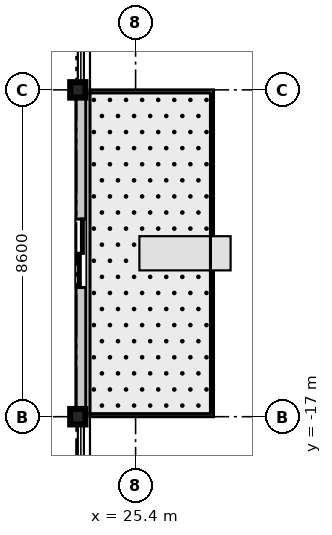
"""IFC4 building model, lengths in metres.
Left out: names, types, materials, properties, quantities, classifications, styles, units other than length and angle.
Written with IfcOpenShell. Run it as: python <this file> out.ifc"""

import sys

from ifc_helpers import new_model, si_unit, direction, frame, frame_2d, origin, origin_2d, place, context, subcontext, project, spatial, rectangle, i_section, extrude, source, transform, mapped, element, fill, save


model = new_model("IFC4")
c1 = context("Model", 3, precision=1e-05, world=origin(), true_north=direction((0.0, 1.0)))
c2 = subcontext(c1, "Body", "Model", "MODEL_VIEW")
j1 = project(units=[si_unit("LENGTHUNIT", "METRE"), si_unit("PLANEANGLEUNIT", "RADIAN")], contexts=[c1])
p1 = place(None, origin())
s1 = spatial("IfcSite", under=j1, at=p1, CompositionType="ELEMENT")
p2 = place(p1, origin())
s2 = spatial("IfcBuilding", under=s1, at=p2, CompositionType="ELEMENT")
p3 = place(p2, frame((0.0, 0.0, 234.5)))
s3 = spatial("IfcBuildingStorey", under=s2, at=p3, CompositionType="ELEMENT", Elevation=234.5)
m1 = source(origin(), c2, "Body", "SweptSolid", [
    extrude(i_section(OverallWidth=0.401, OverallDepth=0.406, WebThickness=0.016, FlangeThickness=0.025, at=origin_2d()), origin(), (0.0, 0.0, 1.0), 3.655),
])
for number, where, z_axis, x_axis in (
    (1, (23.88, -17.0, 0.0), (0.0, 0.0, 1.0), (1.0, 0.0, 0.0)),
    (2, (23.88, -8.4, 0.0), (0.0, 0.0, 1.0), (1.0, 0.0, 0.0)),
):
    element("IfcColumn", number, at=place(p3, frame(where, z_axis=z_axis, x_axis=x_axis)), inside=s3, PredefinedType="COLUMN", context=c2, shape_type="MappedRepresentation", body=[
        mapped(m1, transform((0.0, 0.0, 0.0), scale=1.0)),
    ])
m2 = source(origin(), c2, "Body", "SweptSolid", [
    extrude(rectangle(XDim=8.6, YDim=0.26, at=frame_2d((4.3, 0.0))), origin(), (0.0, 0.0, 1.0), 2.89),
])
p4 = place(p3, frame((23.96, -17.0, 0.0), z_axis=(0.0, 0.0, 1.0), x_axis=(0.0, 1.0, 0.0)))
e3 = element("IfcWall", 3, at=p4, inside=s3, PredefinedType="STANDARD", context=c2, shape_type="MappedRepresentation", body=[
    mapped(m2, transform((0.0, 0.0, 0.0), scale=1.0)),
])
p5 = place(p4, frame((3.4, 0.0, 0.0)))
e4 = element("IfcOpeningElement", 4, at=p5, cuts=e3, PredefinedType="OPENING", context=c2, shape_type="SweptSolid", body=[
    extrude(rectangle(XDim=1.8, YDim=2.25, at=frame_2d((0.9, 1.125))), frame((0.0, 0.14, 0.0), z_axis=(0.0, -1.0, 0.0), x_axis=(1.0, 0.0, 0.0)), (0.0, 0.0, 1.0), 0.28),
])
m3 = source(origin(), c2, "Body", "SweptSolid", [
    extrude(rectangle(XDim=1.8, YDim=2.25, at=frame_2d((0.9, 1.125))), frame((0.0, 0.025, 0.0), z_axis=(0.0, -1.0, 0.0), x_axis=(1.0, 0.0, 0.0)), (0.0, 0.0, 1.0), 0.05),
])
p6 = place(p5, frame((1.8, 0.0, 0.0), z_axis=(0.0, 0.0, 1.0), x_axis=(-1.0, 0.0, 0.0)))
e5 = element("IfcDoor", 5, at=p6, inside=s3, OperationType="DOUBLE_DOOR_SLIDING", PredefinedType="DOOR", context=c2, shape_type="MappedRepresentation", body=[
    mapped(m3, transform((0.0, 0.0, 0.0), scale=1.0)),
])
fill(e4, e5)
save(model, sys.argv[1])
